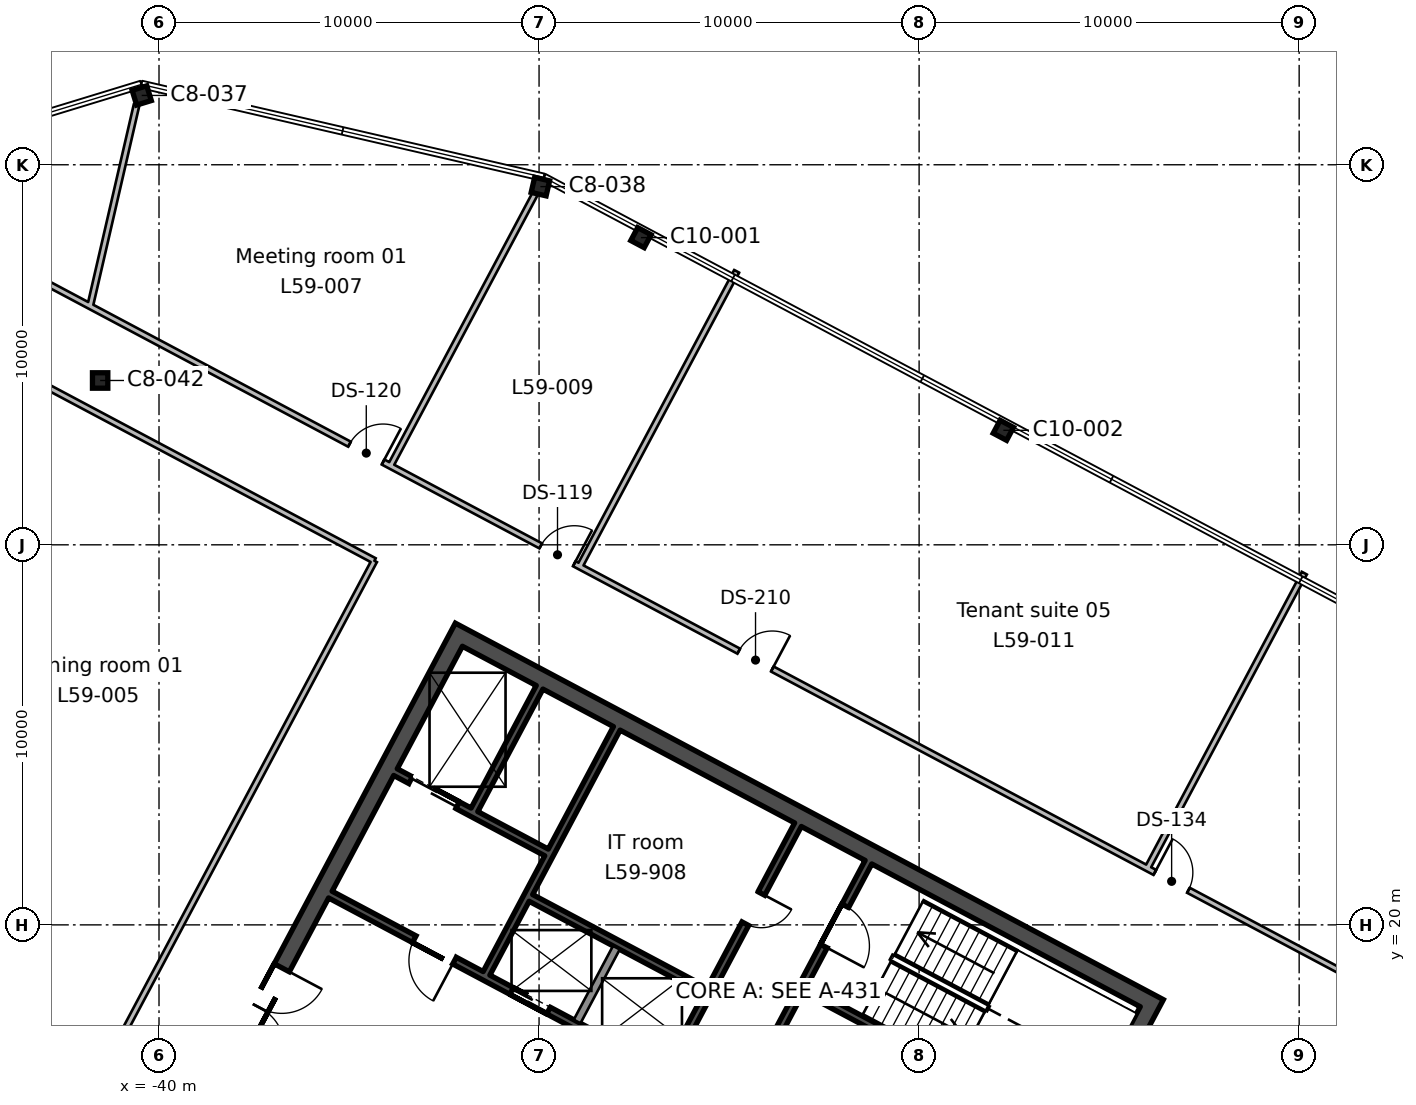
"""IFC4 building model, lengths in metres.
Left out: names, types, materials, properties, quantities, classifications, styles, units other than length and angle.
Written with IfcOpenShell. Run it as: python <this file> out.ifc"""

import sys

from ifc_helpers import new_model, si_unit, direction, frame, frame_2d, origin, origin_2d, place, context, subcontext, project, spatial, rectangle, i_section, extrude, element, fill, save


model = new_model("IFC4")
c1 = context("Model", 3, precision=1e-05, world=origin(), true_north=direction((0.0, 1.0)))
c2 = subcontext(c1, "Body", "Model", "MODEL_VIEW")
j1 = project(units=[si_unit("LENGTHUNIT", "METRE"), si_unit("PLANEANGLEUNIT", "RADIAN")], contexts=[c1])
p1 = place(None, origin())
s1 = spatial("IfcSite", under=j1, at=p1, CompositionType="ELEMENT")
p2 = place(p1, origin())
s2 = spatial("IfcBuilding", under=s1, at=p2, CompositionType="ELEMENT")
p3 = place(p2, frame((0.0, 0.0, 265.8)))
s3 = spatial("IfcBuildingStorey", under=s2, at=p3, CompositionType="ELEMENT", Elevation=265.8)
p4 = place(p3, frame((-17.783, 33.013, 0.0), z_axis=(0.0, 0.0, 1.0), x_axis=(-0.882947592859, 0.469471562786, 0.0)))
e1 = element("IfcColumn", 1, at=p4, inside=s3, PredefinedType="COLUMN", context=c2, shape_type="SweptSolid", body=[
    extrude(i_section(OverallWidth=0.399, OverallDepth=0.386, WebThickness=0.021, FlangeThickness=0.033, FilletRadius=0.015, at=origin_2d()), origin(), (0.0, 0.0, 1.0), 3.9),
])
p5 = place(p3, frame((-41.549, 34.324, 0.0), z_axis=(0.0, 0.0, 1.0), x_axis=(1.0, 0.0, 0.0)))
e2 = element("IfcColumn", 2, at=p5, inside=s3, PredefinedType="COLUMN", context=c2, shape_type="SweptSolid", body=[
    extrude(i_section(OverallWidth=0.404, OverallDepth=0.406, WebThickness=0.027, FlangeThickness=0.044, FilletRadius=0.015, at=origin_2d()), origin(), (0.0, 0.0, 1.0), 3.9),
])
p6 = place(p3, frame((-27.319, 38.083, 0.0), z_axis=(0.0, 0.0, 1.0), x_axis=(-0.882947592859, 0.469471562786, 0.0)))
e3 = element("IfcColumn", 3, at=p6, inside=s3, PredefinedType="COLUMN", context=c2, shape_type="SweptSolid", body=[
    extrude(i_section(OverallWidth=0.399, OverallDepth=0.386, WebThickness=0.021, FlangeThickness=0.033, FilletRadius=0.015, at=origin_2d()), origin(), (0.0, 0.0, 1.0), 3.9),
])
for number, where, z_axis, x_axis in (
    (4, (-29.965, 39.425, 0.0), (0.0, 0.0, 1.0), (-0.974, 0.225, 0.0)),
    (5, (-40.455, 41.824, 0.0), (0.0, 0.0, 1.0), (-0.956, -0.292, 0.0)),
):
    element("IfcColumn", number, at=place(p3, frame(where, z_axis=z_axis, x_axis=x_axis)), inside=s3, PredefinedType="COLUMN", context=c2, shape_type="SweptSolid", body=[
        extrude(i_section(OverallWidth=0.404, OverallDepth=0.406, WebThickness=0.027, FlangeThickness=0.044, FilletRadius=0.015, at=origin_2d()), origin(), (0.0, 0.0, 1.0), 3.9),
    ])
p7 = place(p3, frame((-13.771, 18.138, 0.0), z_axis=(0.0, 0.0, 1.0), x_axis=(-0.469467968382, -0.882949504028, 0.0)))
e6 = element("IfcWall", 6, at=p7, inside=s3, PredefinedType="SHEAR", context=c2, shape_type="SweptSolid", body=[
    extrude(rectangle(XDim=19.1, YDim=0.45, at=frame_2d((9.55, 0.0))), origin(), (0.0, 0.0, 1.0), 3.9),
])
p8 = place(p7, frame((6.55, 0.0, 0.0)))
e7 = element("IfcOpeningElement", 7, at=p8, cuts=e6, PredefinedType="OPENING", context=c2, shape_type="SweptSolid", body=[
    extrude(rectangle(XDim=2.4, YDim=2.4, at=frame_2d((1.2, 1.2))), frame((0.0, 0.235, 0.0), z_axis=(0.0, -1.0, 0.0), x_axis=(1.0, 0.0, 0.0)), (0.0, 0.0, 1.0), 0.47),
])
p9 = place(p3, frame((-32.004, 27.833, 0.0), z_axis=(0.0, 0.0, 1.0), x_axis=(-0.469467968382, -0.882949504028, 0.0)))
e8 = element("IfcWall", 8, at=p9, inside=s3, PredefinedType="SHEAR", context=c2, shape_type="SweptSolid", body=[
    extrude(rectangle(XDim=19.1, YDim=0.45, at=frame_2d((9.55, 0.0))), origin(), (0.0, 0.0, 1.0), 3.9),
])
p10 = place(p9, frame((10.15, 0.0, 0.0)))
e9 = element("IfcOpeningElement", 9, at=p10, cuts=e8, PredefinedType="OPENING", context=c2, shape_type="SweptSolid", body=[
    extrude(rectangle(XDim=2.4, YDim=2.4, at=frame_2d((1.2, 1.2))), frame((0.0, 0.235, 0.0), z_axis=(0.0, -1.0, 0.0), x_axis=(1.0, 0.0, 0.0)), (0.0, 0.0, 1.0), 0.47),
])
p11 = place(p3, frame((-14.076, 18.045, 0.0), z_axis=(0.0, 0.0, 1.0), x_axis=(-0.882947755831, 0.46947125628, 0.0)))
e10 = element("IfcWall", 10, at=p11, inside=s3, PredefinedType="SHEAR", context=c2, shape_type="SweptSolid", body=[
    extrude(rectangle(XDim=20.2, YDim=0.45, at=frame_2d((10.1, 0.0))), origin(), (0.0, 0.0, 1.0), 3.9),
])
p12 = place(p3, frame((-21.333, 21.649, 0.0), z_axis=(0.0, 0.0, 1.0), x_axis=(-0.469494272526, -0.882935517501, 0.0)))
e11 = element("IfcWall", 11, at=p12, inside=s3, PredefinedType="SHEAR", context=c2, shape_type="SweptSolid", body=[
    extrude(rectangle(XDim=7.3, YDim=0.2, at=frame_2d((3.65, 0.0))), origin(), (0.0, 0.0, 1.0), 3.9),
])
p13 = place(p12, frame((1.3, 0.0, 0.0)))
e12 = element("IfcOpeningElement", 12, at=p13, cuts=e11, PredefinedType="OPENING", context=c2, shape_type="SweptSolid", body=[
    extrude(rectangle(XDim=1.2, YDim=2.1, at=frame_2d((0.6, 1.05))), frame((0.0, 0.11, 0.0), z_axis=(0.0, -1.0, 0.0), x_axis=(1.0, 0.0, 0.0)), (0.0, 0.0, 1.0), 0.22),
])
p14 = place(p3, frame((-23.188, 22.635, 0.0), z_axis=(0.0, 0.0, 1.0), x_axis=(-0.469454336211, -0.882956752176, 0.0)))
e13 = element("IfcWall", 13, at=p14, inside=s3, PredefinedType="SHEAR", context=c2, shape_type="SweptSolid", body=[
    extrude(rectangle(XDim=7.3, YDim=0.2, at=frame_2d((3.65, 0.0))), origin(), (0.0, 0.0, 1.0), 3.9),
])
p15 = place(p14, frame((2.05, 0.0, 0.0)))
e14 = element("IfcOpeningElement", 14, at=p15, cuts=e13, PredefinedType="OPENING", context=c2, shape_type="SweptSolid", body=[
    extrude(rectangle(XDim=0.9, YDim=2.1, at=frame_2d((0.45, 1.05))), frame((0.0, 0.11, 0.0), z_axis=(0.0, -1.0, 0.0), x_axis=(1.0, 0.0, 0.0)), (0.0, 0.0, 1.0), 0.22),
])
p16 = place(p3, frame((-27.966, 19.4, 0.0), z_axis=(0.0, 0.0, 1.0), x_axis=(-0.4694473164, -0.882960484464, 0.0)))
e15 = element("IfcWall", 15, at=p16, inside=s3, PredefinedType="SOLIDWALL", context=c2, shape_type="SweptSolid", body=[
    extrude(rectangle(XDim=2.2, YDim=0.2, at=frame_2d((1.1, 0.0))), origin(), (0.0, 0.0, 1.0), 3.9),
])
p17 = place(p3, frame((-27.955, 25.171, 0.0), z_axis=(0.0, 0.0, 1.0), x_axis=(-0.469480409012, -0.88294288918, 0.0)))
e16 = element("IfcWall", 16, at=p17, inside=s3, PredefinedType="SHEAR", context=c2, shape_type="SweptSolid", body=[
    extrude(rectangle(XDim=7.3, YDim=0.2, at=frame_2d((3.65, 0.0))), origin(), (0.0, 0.0, 1.0), 3.9),
])
p18 = place(p3, frame((-29.986, 26.25, 0.0), z_axis=(0.0, 0.0, 1.0), x_axis=(-0.469494272526, -0.882935517501, 0.0)))
e17 = element("IfcWall", 17, at=p18, inside=s3, PredefinedType="SHEAR", context=c2, shape_type="SweptSolid", body=[
    extrude(rectangle(XDim=3.65, YDim=0.2, at=frame_2d((1.825, 0.0))), origin(), (0.0, 0.0, 1.0), 3.9),
])
p19 = place(p3, frame((-15.942, 14.536, 0.0), z_axis=(0.0, 0.0, 1.0), x_axis=(-0.882946947542, 0.469472776449, 0.0)))
e18 = element("IfcWall", 18, at=p19, inside=s3, PredefinedType="SHEAR", context=c2, shape_type="SweptSolid", body=[
    extrude(rectangle(XDim=8.0, YDim=0.2, at=frame_2d((4.0, 0.0))), origin(), (0.0, 0.0, 1.0), 3.9),
])
p20 = place(p3, frame((-29.804, 21.906, 0.0), z_axis=(0.0, 0.0, 1.0), x_axis=(-0.882960433586, 0.469447412093, 0.0)))
e19 = element("IfcWall", 19, at=p20, inside=s3, PredefinedType="SHEAR", context=c2, shape_type="SweptSolid", body=[
    extrude(rectangle(XDim=4.5, YDim=0.2, at=frame_2d((2.25, 0.0))), origin(), (0.0, 0.0, 1.0), 3.9),
])
p21 = place(p20, frame((2.65, 0.0, 0.0)))
e20 = element("IfcOpeningElement", 20, at=p21, cuts=e19, PredefinedType="OPENING", context=c2, shape_type="SweptSolid", body=[
    extrude(rectangle(XDim=1.4, YDim=2.4, at=frame_2d((0.7, 1.2))), frame((0.0, 0.11, 0.0), z_axis=(0.0, -1.0, 0.0), x_axis=(1.0, 0.0, 0.0)), (0.0, 0.0, 1.0), 0.22),
])
p22 = place(p3, frame((-25.623, 18.268, 0.0), z_axis=(0.0, 0.0, 1.0), x_axis=(-0.882953967957, 0.469459572775, 0.0)))
e21 = element("IfcWall", 21, at=p22, inside=s3, PredefinedType="SHEAR", context=c2, shape_type="SweptSolid", body=[
    extrude(rectangle(XDim=5.2, YDim=0.2, at=frame_2d((2.6, 0.0))), origin(), (0.0, 0.0, 1.0), 3.9),
])
p23 = place(p3, frame((-26.662, 16.102, 0.0), z_axis=(0.0, 0.0, 1.0), x_axis=(-0.882940221191, 0.469485426614, 0.0)))
e22 = element("IfcWall", 22, at=p23, inside=s3, PredefinedType="SHEAR", context=c2, shape_type="SweptSolid", body=[
    extrude(rectangle(XDim=10.0, YDim=0.2, at=frame_2d((5.0, 0.0))), origin(), (0.0, 0.0, 1.0), 3.9),
])
p24 = place(p23, frame((6.3, 0.0, 0.0)))
e23 = element("IfcOpeningElement", 23, at=p24, cuts=e22, PredefinedType="OPENING", context=c2, shape_type="SweptSolid", body=[
    extrude(rectangle(XDim=1.2, YDim=2.1, at=frame_2d((0.6, 1.05))), frame((0.0, 0.11, 0.0), z_axis=(0.0, -1.0, 0.0), x_axis=(1.0, 0.0, 0.0)), (0.0, 0.0, 1.0), 0.22),
])
p25 = place(p23, frame((0.8, 0.0, 0.0)))
e24 = element("IfcOpeningElement", 24, at=p25, cuts=e22, PredefinedType="OPENING", context=c2, shape_type="SweptSolid", body=[
    extrude(rectangle(XDim=1.1, YDim=2.1, at=frame_2d((0.55, 1.05))), frame((0.0, 0.11, 0.0), z_axis=(0.0, -1.0, 0.0), x_axis=(1.0, 0.0, 0.0)), (0.0, 0.0, 1.0), 0.22),
])
p26 = place(p23, frame((3.5, 0.0, 0.0)))
e25 = element("IfcOpeningElement", 25, at=p26, cuts=e22, PredefinedType="OPENING", context=c2, shape_type="SweptSolid", body=[
    extrude(rectangle(XDim=1.1, YDim=2.1, at=frame_2d((0.55, 1.05))), frame((0.0, 0.11, 0.0), z_axis=(0.0, -1.0, 0.0), x_axis=(1.0, 0.0, 0.0)), (0.0, 0.0, 1.0), 0.22),
])
p27 = place(p3, frame((-48.541, 39.854, 0.0), z_axis=(0.0, 0.0, 1.0), x_axis=(0.882945008423, -0.469476423372, 0.0)))
e26 = element("IfcWall", 26, at=p27, inside=s3, PredefinedType="PARTITIONING", context=c2, shape_type="SweptSolid", body=[
    extrude(rectangle(XDim=54.976, YDim=0.15, at=frame_2d((27.488, 0.0))), origin(), (0.0, 0.0, 1.0), 3.54),
])
p28 = place(p27, frame((50.65, 0.0, 0.0)))
e27 = element("IfcOpeningElement", 27, at=p28, cuts=e26, PredefinedType="OPENING", context=c2, shape_type="SweptSolid", body=[
    extrude(rectangle(XDim=1.8, YDim=2.1, at=frame_2d((0.9, 1.05))), frame((0.0, 0.085, 0.0), z_axis=(0.0, -1.0, 0.0), x_axis=(1.0, 0.0, 0.0)), (0.0, 0.0, 1.0), 0.17),
])
p29 = place(p27, frame((39.35, 0.0, 0.0)))
e28 = element("IfcOpeningElement", 28, at=p29, cuts=e26, PredefinedType="OPENING", context=c2, shape_type="SweptSolid", body=[
    extrude(rectangle(XDim=1.0, YDim=2.1, at=frame_2d((0.5, 1.05))), frame((0.0, 0.085, 0.0), z_axis=(0.0, -1.0, 0.0), x_axis=(1.0, 0.0, 0.0)), (0.0, 0.0, 1.0), 0.17),
])
p30 = place(p27, frame((26.95, 0.0, 0.0)))
e29 = element("IfcOpeningElement", 29, at=p30, cuts=e26, PredefinedType="OPENING", context=c2, shape_type="SweptSolid", body=[
    extrude(rectangle(XDim=1.0, YDim=2.1, at=frame_2d((0.5, 1.05))), frame((0.0, 0.085, 0.0), z_axis=(0.0, -1.0, 0.0), x_axis=(1.0, 0.0, 0.0)), (0.0, 0.0, 1.0), 0.17),
])
p31 = place(p27, frame((21.049, 0.0, 0.0)))
e30 = element("IfcOpeningElement", 30, at=p31, cuts=e26, PredefinedType="OPENING", context=c2, shape_type="SweptSolid", body=[
    extrude(rectangle(XDim=1.0, YDim=2.1, at=frame_2d((0.5, 1.05))), frame((0.0, 0.085, 0.0), z_axis=(0.0, -1.0, 0.0), x_axis=(1.0, 0.0, 0.0)), (0.0, 0.0, 1.0), 0.17),
])
p32 = place(p27, frame((15.35, 0.0, 0.0)))
e31 = element("IfcOpeningElement", 31, at=p32, cuts=e26, PredefinedType="OPENING", context=c2, shape_type="SweptSolid", body=[
    extrude(rectangle(XDim=1.0, YDim=2.1, at=frame_2d((0.5, 1.05))), frame((0.0, 0.085, 0.0), z_axis=(0.0, -1.0, 0.0), x_axis=(1.0, 0.0, 0.0)), (0.0, 0.0, 1.0), 0.17),
])
p33 = place(p3, frame((-42.984, 34.181, 0.0), z_axis=(0.0, 0.0, 1.0), x_axis=(0.882924032888, -0.469515869964, 0.0)))
e32 = element("IfcWall", 32, at=p33, inside=s3, PredefinedType="PARTITIONING", context=c2, shape_type="SweptSolid", body=[
    extrude(rectangle(XDim=9.799, YDim=0.15, at=frame_2d((4.899, 0.0))), origin(), (0.0, 0.0, 1.0), 3.54),
])
p34 = place(p3, frame((-34.332, 29.58, 0.0), z_axis=(0.0, 0.0, 1.0), x_axis=(-0.469446756585, -0.882960782103, 0.0)))
e33 = element("IfcWall", 33, at=p34, inside=s3, PredefinedType="PARTITIONING", context=c2, shape_type="SweptSolid", body=[
    extrude(rectangle(XDim=20.0, YDim=0.15, at=frame_2d((10.0, 0.0))), origin(), (0.0, 0.0, 1.0), 3.54),
])
p35 = place(p3, frame((-30.098, 39.247, 0.0), z_axis=(0.0, 0.0, 1.0), x_axis=(-0.469424042577, -0.882972858162, 0.0)))
e34 = element("IfcWall", 34, at=p35, inside=s3, PredefinedType="PARTITIONING", context=c2, shape_type="SweptSolid", body=[
    extrude(rectangle(XDim=8.123, YDim=0.15, at=frame_2d((4.062, 0.0))), origin(), (0.0, 0.0, 1.0), 3.54),
])
p36 = place(p3, frame((-41.813, 36.276, 0.0), z_axis=(0.0, 0.0, 1.0), x_axis=(0.224866064011, 0.974389682445, 0.0)))
e35 = element("IfcWall", 35, at=p36, inside=s3, PredefinedType="PARTITIONING", context=c2, shape_type="SweptSolid", body=[
    extrude(rectangle(XDim=5.438, YDim=0.15, at=frame_2d((2.719, 0.0))), origin(), (0.0, 0.0, 1.0), 3.54),
])
p37 = place(p3, frame((-24.8, 37.197, 0.0), z_axis=(0.0, 0.0, 1.0), x_axis=(-0.469510830369, -0.882926712794, 0.0)))
e36 = element("IfcWall", 36, at=p37, inside=s3, PredefinedType="PARTITIONING", context=c2, shape_type="SweptSolid", body=[
    extrude(rectangle(XDim=8.8, YDim=0.15, at=frame_2d((4.4, 0.0))), origin(), (0.0, 0.0, 1.0), 3.54),
])
p38 = place(p3, frame((-9.864, 29.255, 0.0), z_axis=(0.0, 0.0, 1.0), x_axis=(-0.469457446168, -0.882955098653, 0.0)))
e37 = element("IfcWall", 37, at=p38, inside=s3, PredefinedType="PARTITIONING", context=c2, shape_type="SweptSolid", body=[
    extrude(rectangle(XDim=8.8, YDim=0.15, at=frame_2d((4.4, 0.0))), origin(), (0.0, 0.0, 1.0), 3.54),
])
p39 = place(p10, origin())
e38 = element("IfcDoor", 38, at=p39, inside=s3, OperationType="DOUBLE_DOOR_SINGLE_SWING", PredefinedType="DOOR", context=c2, shape_type="SweptSolid", body=[
    extrude(rectangle(XDim=2.4, YDim=2.4, at=frame_2d((1.2, 1.2))), frame((0.0, 0.025, 0.0), z_axis=(0.0, -1.0, 0.0), x_axis=(1.0, 0.0, 0.0)), (0.0, 0.0, 1.0), 0.05),
])
fill(e9, e38)
p40 = place(p24, origin())
e39 = element("IfcDoor", 39, at=p40, inside=s3, OperationType="SINGLE_SWING_LEFT", PredefinedType="DOOR", context=c2, shape_type="SweptSolid", body=[
    extrude(rectangle(XDim=1.2, YDim=2.1, at=frame_2d((0.6, 1.05))), frame((0.0, 0.025, 0.0), z_axis=(0.0, -1.0, 0.0), x_axis=(1.0, 0.0, 0.0)), (0.0, 0.0, 1.0), 0.05),
])
fill(e23, e39)
p41 = place(p13, origin())
e40 = element("IfcDoor", 40, at=p41, inside=s3, OperationType="SINGLE_SWING_RIGHT", PredefinedType="DOOR", context=c2, shape_type="SweptSolid", body=[
    extrude(rectangle(XDim=1.2, YDim=2.1, at=frame_2d((0.6, 1.05))), frame((0.0, 0.025, 0.0), z_axis=(0.0, -1.0, 0.0), x_axis=(1.0, 0.0, 0.0)), (0.0, 0.0, 1.0), 0.05),
])
fill(e12, e40)
p42 = place(p26, origin())
e41 = element("IfcDoor", 41, at=p42, inside=s3, OperationType="DOUBLE_DOOR_SLIDING", PredefinedType="DOOR", context=c2, shape_type="SweptSolid", body=[
    extrude(rectangle(XDim=1.1, YDim=2.1, at=frame_2d((0.55, 1.05))), frame((0.0, 0.025, 0.0), z_axis=(0.0, -1.0, 0.0), x_axis=(1.0, 0.0, 0.0)), (0.0, 0.0, 1.0), 0.05),
])
fill(e25, e41)
p43 = place(p21, origin())
e42 = element("IfcDoor", 42, at=p43, inside=s3, OperationType="DOUBLE_DOOR_SLIDING", PredefinedType="DOOR", context=c2, shape_type="SweptSolid", body=[
    extrude(rectangle(XDim=1.4, YDim=2.4, at=frame_2d((0.7, 1.2))), frame((0.0, 0.025, 0.0), z_axis=(0.0, -1.0, 0.0), x_axis=(1.0, 0.0, 0.0)), (0.0, 0.0, 1.0), 0.05),
])
fill(e20, e42)
p44 = place(p15, origin())
e43 = element("IfcDoor", 43, at=p44, inside=s3, OperationType="SINGLE_SWING_LEFT", PredefinedType="DOOR", context=c2, shape_type="SweptSolid", body=[
    extrude(rectangle(XDim=0.9, YDim=2.1, at=frame_2d((0.45, 1.05))), frame((0.0, 0.025, 0.0), z_axis=(0.0, -1.0, 0.0), x_axis=(1.0, 0.0, 0.0)), (0.0, 0.0, 1.0), 0.05),
])
fill(e14, e43)
p45 = place(p29, origin())
e44 = element("IfcDoor", 44, at=p45, inside=s3, OperationType="SINGLE_SWING_LEFT", PredefinedType="DOOR", context=c2, shape_type="SweptSolid", body=[
    extrude(rectangle(XDim=1.0, YDim=2.1, at=frame_2d((0.5, 1.05))), frame((0.0, 0.025, 0.0), z_axis=(0.0, -1.0, 0.0), x_axis=(1.0, 0.0, 0.0)), (0.0, 0.0, 1.0), 0.05),
])
fill(e28, e44)
p46 = place(p30, origin())
e45 = element("IfcDoor", 45, at=p46, inside=s3, OperationType="SINGLE_SWING_RIGHT", PredefinedType="DOOR", context=c2, shape_type="SweptSolid", body=[
    extrude(rectangle(XDim=1.0, YDim=2.1, at=frame_2d((0.5, 1.05))), frame((0.0, 0.025, 0.0), z_axis=(0.0, -1.0, 0.0), x_axis=(1.0, 0.0, 0.0)), (0.0, 0.0, 1.0), 0.05),
])
fill(e29, e45)
p47 = place(p31, origin())
e46 = element("IfcDoor", 46, at=p47, inside=s3, OperationType="SINGLE_SWING_RIGHT", PredefinedType="DOOR", context=c2, shape_type="SweptSolid", body=[
    extrude(rectangle(XDim=1.0, YDim=2.1, at=frame_2d((0.5, 1.05))), frame((0.0, 0.025, 0.0), z_axis=(0.0, -1.0, 0.0), x_axis=(1.0, 0.0, 0.0)), (0.0, 0.0, 1.0), 0.05),
])
fill(e30, e46)
p48 = place(p32, origin())
e47 = element("IfcDoor", 47, at=p48, inside=s3, OperationType="SINGLE_SWING_RIGHT", PredefinedType="DOOR", context=c2, shape_type="SweptSolid", body=[
    extrude(rectangle(XDim=1.0, YDim=2.1, at=frame_2d((0.5, 1.05))), frame((0.0, 0.025, 0.0), z_axis=(0.0, -1.0, 0.0), x_axis=(1.0, 0.0, 0.0)), (0.0, 0.0, 1.0), 0.05),
])
fill(e31, e47)
save(model, sys.argv[1])
